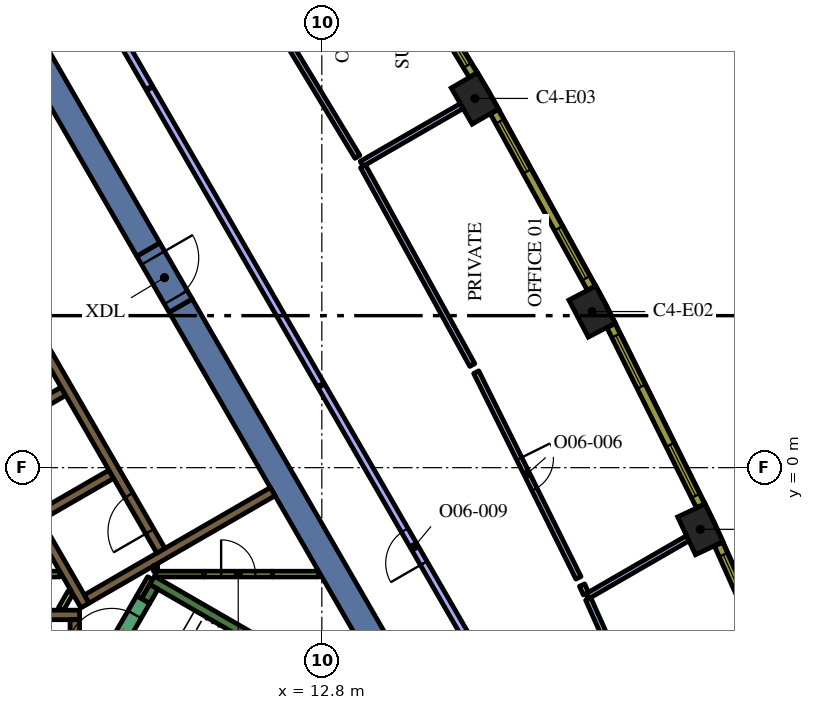
"""IFC4 building model, lengths in metres.
Left out: names, types, materials, properties, quantities, classifications, styles, units other than length and angle.
Written with IfcOpenShell. Run it as: python <this file> out.ifc"""

import sys

from ifc_helpers import new_model, si_unit, direction, frame, frame_2d, origin, origin_2d, place, context, subcontext, project, spatial, polyline, rectangle, outline, extrude, element, fill, save


model = new_model("IFC4")
c1 = context("Model", 3, precision=1e-05, world=origin(), true_north=direction((0.0, 1.0)))
c2 = subcontext(c1, "Body", "Model", "MODEL_VIEW")
j1 = project(units=[si_unit("LENGTHUNIT", "METRE"), si_unit("PLANEANGLEUNIT", "RADIAN")], contexts=[c1])
p1 = place(None, origin())
s1 = spatial("IfcSite", under=j1, at=p1, CompositionType="ELEMENT")
p2 = place(p1, origin())
s2 = spatial("IfcBuilding", under=s1, at=p2, CompositionType="ELEMENT")
p3 = place(p2, frame((0.0, 0.0, 210.0)))
s3 = spatial("IfcBuildingStorey", under=s2, at=p3, CompositionType="ELEMENT", Elevation=210.0)
for number, where, z_axis, x_axis in (
    (1, (22.76, -1.623, 0.0), (0.0, 0.0, 1.0), (-0.426, 0.905, 0.0)),
    (2, (19.912, 4.108, 0.0), (0.0, 0.0, 1.0), (-0.464, 0.886, 0.0)),
    (3, (16.827, 9.715, 0.0), (0.0, 0.0, 1.0), (-0.5, 0.866, 0.0)),
):
    element("IfcColumn", number, at=place(p3, frame(where, z_axis=z_axis, x_axis=x_axis)), inside=s3, PredefinedType="COLUMN", context=c2, shape_type="SweptSolid", body=[
        extrude(rectangle(XDim=1.1, YDim=0.8, at=origin_2d()), origin(), (0.0, 0.0, 1.0), 4.2),
    ])
for number, where, z_axis, x_axis in (
    (4, (9.085, 4.264, 0.0), (0.0, 0.0, 1.0), (0.5, -0.866, 0.0)),
    (5, (8.235, 5.736, 0.0), (0.0, 0.0, 1.0), (-0.5, 0.866, 0.0)),
):
    element("IfcWall", number, at=place(p3, frame(where, z_axis=z_axis, x_axis=x_axis)), inside=s3, PredefinedType="SOLIDWALL", context=c2, shape_type="SweptSolid", body=[
        extrude(rectangle(XDim=12.472, YDim=0.7, at=frame_2d((6.236, 0.0))), origin(), (0.0, 0.0, 1.0), 4.2),
    ])
p4 = place(p3, frame((8.334, -2.964, 0.0), z_axis=(0.0, 0.0, 1.0), x_axis=(0.866016039709, -0.500016218704, 0.0)))
e6 = element("IfcWall", 6, at=p4, inside=s3, PredefinedType="SOLIDWALL", context=c2, shape_type="SweptSolid", body=[
    extrude(rectangle(XDim=7.05, YDim=0.25, at=frame_2d((3.525, 0.0))), origin(), (0.0, 0.0, 1.0), 4.2),
])
p5 = place(p3, frame((8.163, -3.511, 0.0), z_axis=(0.0, 0.0, 1.0), x_axis=(0.500127794843, 0.865951608824, 0.0)))
e7 = element("IfcWall", 7, at=p5, inside=s3, PredefinedType="SOLIDWALL", context=c2, shape_type="SweptSolid", body=[
    extrude(rectangle(XDim=0.435, YDim=0.25, at=frame_2d((0.217, 0.0))), origin(), (0.0, 0.0, 1.0), 4.2),
])
p6 = place(p3, frame((-5.806, -3.875, 0.0), z_axis=(0.0, 0.0, 1.0), x_axis=(1.0, 0.0, 0.0)))
e8 = element("IfcWall", 8, at=p6, inside=s3, PredefinedType="SOLIDWALL", context=c2, shape_type="SweptSolid", body=[
    extrude(rectangle(XDim=12.231, YDim=0.25, at=frame_2d((6.116, 0.0))), origin(), (0.0, 0.0, 1.0), 4.2),
])
p7 = place(p3, frame((6.3, -7.24, 0.0), z_axis=(0.0, 0.0, 1.0), x_axis=(0.0, 1.0, 0.0)))
e9 = element("IfcWall", 9, at=p7, inside=s3, PredefinedType="SOLIDWALL", context=c2, shape_type="SweptSolid", body=[
    extrude(rectangle(XDim=3.24, YDim=0.25, at=frame_2d((1.62, 0.0))), origin(), (0.0, 0.0, 1.0), 4.2),
])
p8 = place(p3, origin())
e10 = element("IfcWall", 10, at=p8, inside=s3, PredefinedType="SOLIDWALL", context=c2, shape_type="SweptSolid", body=[
    extrude(outline(polyline([(0.332, 6.925), (0.335, 6.925), (0.335, 6.925), (0.335, 6.925), (0.335, 7.075), (0.335, 7.075), (0.335, 7.075), (0.245, 7.075), (0.035, 7.439), (0.252, 7.564), (0.377, 7.348), (1.512, 5.382), (1.637, 5.165), (2.221, 4.153), (2.771, 3.199), (2.896, 2.983), (3.138, 2.564), (4.031, 1.017), (4.156, 0.801), (5.292, -1.165), (5.417, -1.382), (6.073, -2.519), (6.552, -3.348), (6.677, -3.564), (6.46, -3.689), (0.332, 6.925)])), origin(), (0.0, 0.0, 1.0), 4.2),
])
for number, where, z_axis, x_axis in (
    (11, (4.094, 0.909, 0.0), (0.0, 0.0, 1.0), (0.866, 0.5, 0.0)),
    (12, (5.354, -1.274, 0.0), (0.0, 0.0, 1.0), (0.866, 0.5, 0.0)),
):
    element("IfcWall", number, at=place(p3, frame(where, z_axis=z_axis, x_axis=x_axis)), inside=s3, PredefinedType="SOLIDWALL", context=c2, shape_type="SweptSolid", body=[
        extrude(rectangle(XDim=2.2, YDim=0.25, at=frame_2d((1.1, 0.0))), origin(), (0.0, 0.0, 1.0), 4.2),
    ])
p9 = place(p3, frame((11.507, -0.631, 0.0), z_axis=(0.0, 0.0, 1.0), x_axis=(-0.866011447264, -0.500024172624, 0.0)))
e13 = element("IfcWall", 13, at=p9, inside=s3, PredefinedType="SOLIDWALL", context=c2, shape_type="SweptSolid", body=[
    extrude(rectangle(XDim=5.65, YDim=0.25, at=frame_2d((2.825, 0.0))), origin(), (0.0, 0.0, 1.0), 4.2),
])
p10 = place(p3, frame((3.238, -2.8, 0.0), z_axis=(0.0, 0.0, 1.0), x_axis=(1.0, 0.0, 0.0)))
e14 = element("IfcWall", 14, at=p10, inside=s3, PredefinedType="PARTITIONING", context=c2, shape_type="SweptSolid", body=[
    extrude(rectangle(XDim=2.672, YDim=0.15, at=frame_2d((1.336, 0.0))), origin(), (0.0, 0.0, 1.0), 3.45),
])
p11 = place(p3, frame((8.412, -2.8, 0.0), z_axis=(0.0, 0.0, 1.0), x_axis=(1.0, 0.0, 0.0)))
e15 = element("IfcWall", 15, at=p11, inside=s3, PredefinedType="PARTITIONING", context=c2, shape_type="SweptSolid", body=[
    extrude(rectangle(XDim=1.288, YDim=0.15, at=frame_2d((0.644, 0.0))), origin(), (0.0, 0.0, 1.0), 4.2),
])
p12 = place(p3, frame((8.37, -2.65, 0.0), z_axis=(0.0, 0.0, 1.0), x_axis=(1.0, 0.0, 0.0)))
e16 = element("IfcWall", 16, at=p12, inside=s3, PredefinedType="PARTITIONING", context=c2, shape_type="SweptSolid", body=[
    extrude(rectangle(XDim=0.108, YDim=0.15, at=frame_2d((0.054, 0.0))), origin(), (0.0, 0.0, 1.0), 4.2),
])
p13 = place(p3, frame((8.281, -2.907, 0.0), z_axis=(0.0, 0.0, 1.0), x_axis=(-0.500193841991, -0.86591346013, 0.0)))
e17 = element("IfcWall", 17, at=p13, inside=s3, PredefinedType="PARTITIONING", context=c2, shape_type="SweptSolid", body=[
    extrude(rectangle(XDim=0.583, YDim=0.15, at=frame_2d((0.292, 0.0))), origin(), (0.0, 0.0, 1.0), 4.2),
])
p14 = place(p3, frame((11.5, -2.801, 0.0), z_axis=(0.0, 0.0, 1.0), x_axis=(1.0, 0.0, 0.0)))
e18 = element("IfcWall", 18, at=p14, inside=s3, PredefinedType="PARTITIONING", context=c2, shape_type="SweptSolid", body=[
    extrude(rectangle(XDim=1.222, YDim=0.15, at=frame_2d((0.611, 0.0))), origin(), (0.0, 0.0, 1.0), 3.45),
])
p15 = place(p3, frame((5.936, -3.718, 0.0), z_axis=(0.0, 0.0, 1.0), x_axis=(0.499890179513, 0.866088799389, 0.0)))
e19 = element("IfcWall", 19, at=p15, inside=s3, PredefinedType="PARTITIONING", context=c2, shape_type="SweptSolid", body=[
    extrude(rectangle(XDim=0.504, YDim=0.15, at=frame_2d((0.252, 0.0))), origin(), (0.0, 0.0, 1.0), 3.45),
])
p16 = place(p3, frame((8.565, -2.185, 0.0), z_axis=(0.0, 0.0, 1.0), x_axis=(-0.499997954832, 0.866026584559, 0.0)))
e20 = element("IfcWall", 20, at=p16, inside=s3, PredefinedType="SOLIDWALL", context=c2, shape_type="SweptSolid", body=[
    extrude(rectangle(XDim=12.35, YDim=0.25, at=frame_2d((6.175, 0.0))), origin(), (0.0, 0.0, 1.0), 4.2),
])
p17 = place(p16, frame((0.585, 0.0, 0.0)))
e21 = element("IfcOpeningElement", 21, at=p17, cuts=e20, PredefinedType="OPENING", context=c2, shape_type="SweptSolid", body=[
    extrude(rectangle(XDim=1.1, YDim=2.1, at=frame_2d((0.55, 1.05))), frame((0.0, 0.135, 0.0), z_axis=(0.0, -1.0, 0.0), x_axis=(1.0, 0.0, 0.0)), (0.0, 0.0, 1.0), 0.27),
])
p18 = place(p3, frame((7.048, -5.292, 0.0), z_axis=(0.0, 0.0, 1.0), x_axis=(0.49994051562, 0.866059744384, 0.0)))
e22 = element("IfcWall", 22, at=p18, inside=s3, PredefinedType="SOLIDWALL", context=c2, shape_type="SweptSolid", body=[
    extrude(rectangle(XDim=2.1, YDim=0.4, at=frame_2d((1.05, 0.0))), origin(), (0.0, 0.0, 1.0), 4.2),
])
p19 = place(p18, frame((0.45, 0.0, 0.0)))
e23 = element("IfcOpeningElement", 23, at=p19, cuts=e22, PredefinedType="OPENING", context=c2, shape_type="SweptSolid", body=[
    extrude(rectangle(XDim=1.2, YDim=2.1, at=frame_2d((0.6, 1.05))), frame((0.0, 0.21, 0.0), z_axis=(0.0, -1.0, 0.0), x_axis=(1.0, 0.0, 0.0)), (0.0, 0.0, 1.0), 0.42),
])
p20 = place(p3, frame((8.235, 5.736, 0.0), z_axis=(0.0, 0.0, 1.0), x_axis=(0.499954529098, -0.86605165483, 0.0)))
e24 = element("IfcWall", 24, at=p20, inside=s3, PredefinedType="SOLIDWALL", context=c2, shape_type="SweptSolid", body=[
    extrude(rectangle(XDim=1.7, YDim=0.7, at=frame_2d((0.85, 0.0))), origin(), (0.0, 0.0, 1.0), 4.2),
])
p21 = place(p20, frame((0.25, 0.0, 0.0)))
e25 = element("IfcOpeningElement", 25, at=p21, cuts=e24, PredefinedType="OPENING", context=c2, shape_type="SweptSolid", body=[
    extrude(rectangle(XDim=1.2, YDim=2.1, at=frame_2d((0.6, 1.05))), frame((0.0, 0.36, 0.0), z_axis=(0.0, -1.0, 0.0), x_axis=(1.0, 0.0, 0.0)), (0.0, 0.0, 1.0), 0.72),
])
p22 = place(p3, frame((9.7, -2.8, 0.0), z_axis=(0.0, 0.0, 1.0), x_axis=(1.0, 0.0, 0.0)))
e26 = element("IfcWall", 26, at=p22, inside=s3, PredefinedType="PARTITIONING", context=c2, shape_type="SweptSolid", body=[
    extrude(rectangle(XDim=1.8, YDim=0.15, at=frame_2d((0.9, 0.0))), origin(), (0.0, 0.0, 1.0), 3.45),
])
p23 = place(p22, frame((0.45, 0.0, 0.0)))
e27 = element("IfcOpeningElement", 27, at=p23, cuts=e26, PredefinedType="OPENING", context=c2, shape_type="SweptSolid", body=[
    extrude(rectangle(XDim=0.9, YDim=2.1, at=frame_2d((0.45, 1.05))), frame((0.0, 0.085, 0.0), z_axis=(0.0, -1.0, 0.0), x_axis=(1.0, 0.0, 0.0)), (0.0, 0.0, 1.0), 0.17),
])
p24 = place(p3, frame((19.78, -3.386, 0.0), z_axis=(0.0, 0.0, 1.0), x_axis=(0.866063280451, 0.49993438995, 0.0)))
e28 = element("IfcWall", 28, at=p24, inside=s3, PredefinedType="PARTITIONING", context=c2, shape_type="SweptSolid", body=[
    extrude(rectangle(XDim=3.058, YDim=0.15, at=frame_2d((1.529, 0.0))), origin(), (0.0, 0.0, 1.0), 3.45),
])
p25 = place(p3, frame((19.811, -3.455, 0.0), z_axis=(0.0, 0.0, 1.0), x_axis=(0.407605393886, -0.913158169692, 0.0)))
e29 = element("IfcWall", 29, at=p25, inside=s3, PredefinedType="PARTITIONING", context=c2, shape_type="SweptSolid", body=[
    extrude(rectangle(XDim=5.279, YDim=0.15, at=frame_2d((2.64, 0.0))), origin(), (0.0, 0.0, 1.0), 3.45),
])
p26 = place(p25, frame((2.179, 0.0, 0.0)))
e30 = element("IfcOpeningElement", 30, at=p26, cuts=e29, PredefinedType="OPENING", context=c2, shape_type="SweptSolid", body=[
    extrude(rectangle(XDim=0.9, YDim=2.1, at=frame_2d((0.45, 1.05))), frame((0.0, 0.085, 0.0), z_axis=(0.0, -1.0, 0.0), x_axis=(1.0, 0.0, 0.0)), (0.0, 0.0, 1.0), 0.17),
])
p27 = place(p3, frame((13.848, 7.995, 0.0), z_axis=(0.0, 0.0, 1.0), x_axis=(0.86603583403, 0.49998193385, 0.0)))
e31 = element("IfcWall", 31, at=p27, inside=s3, PredefinedType="PARTITIONING", context=c2, shape_type="SweptSolid", body=[
    extrude(rectangle(XDim=3.041, YDim=0.15, at=frame_2d((1.52, 0.0))), origin(), (0.0, 0.0, 1.0), 3.45),
])
p28 = place(p3, frame((19.75, -3.317, 0.0), z_axis=(0.0, 0.0, 1.0), x_axis=(-0.406774979688, 0.913528388119, 0.0)))
e32 = element("IfcWall", 32, at=p28, inside=s3, PredefinedType="PARTITIONING", context=c2, shape_type="SweptSolid", body=[
    extrude(rectangle(XDim=0.249, YDim=0.15, at=frame_2d((0.125, 0.0))), origin(), (0.0, 0.0, 1.0), 3.45),
])
p29 = place(p3, frame((16.863, 2.513, 0.0), z_axis=(0.0, 0.0, 1.0), x_axis=(0.445159947046, -0.895451071553, 0.0)))
e33 = element("IfcWall", 33, at=p29, inside=s3, PredefinedType="PARTITIONING", context=c2, shape_type="SweptSolid", body=[
    extrude(rectangle(XDim=6.043, YDim=0.15, at=frame_2d((3.021, 0.0))), origin(), (0.0, 0.0, 1.0), 3.45),
])
p30 = place(p29, frame((2.542, 0.0, 0.0)))
e34 = element("IfcOpeningElement", 34, at=p30, cuts=e33, PredefinedType="OPENING", context=c2, shape_type="SweptSolid", body=[
    extrude(rectangle(XDim=0.9, YDim=2.1, at=frame_2d((0.45, 1.05))), frame((0.0, 0.085, 0.0), z_axis=(0.0, -1.0, 0.0), x_axis=(1.0, 0.0, 0.0)), (0.0, 0.0, 1.0), 0.17),
])
p31 = place(p3, frame((16.76, 2.7, 0.0), z_axis=(0.0, 0.0, 1.0), x_axis=(-0.481907755985, 0.876221955169, 0.0)))
e35 = element("IfcWall", 35, at=p31, inside=s3, PredefinedType="PARTITIONING", context=c2, shape_type="SweptSolid", body=[
    extrude(rectangle(XDim=5.967, YDim=0.15, at=frame_2d((2.984, 0.0))), origin(), (0.0, 0.0, 1.0), 3.45),
])
p32 = place(p3, frame((13.737, 8.178, 0.0), z_axis=(0.0, 0.0, 1.0), x_axis=(-0.517884383874, 0.855450620983, 0.0)))
e36 = element("IfcWall", 36, at=p32, inside=s3, PredefinedType="PARTITIONING", context=c2, shape_type="SweptSolid", body=[
    extrude(rectangle(XDim=6.043, YDim=0.15, at=frame_2d((3.021, 0.0))), origin(), (0.0, 0.0, 1.0), 3.45),
])
p33 = place(p3, frame((12.772, 2.178, 0.0), z_axis=(0.0, 0.0, 1.0), x_axis=(-0.5000018851, 0.866024315419, 0.0)))
e37 = element("IfcWall", 37, at=p33, inside=s3, PredefinedType="PARTITIONING", context=c2, shape_type="SweptSolid", body=[
    extrude(rectangle(XDim=9.0, YDim=0.2, at=frame_2d((4.5, 0.0))), origin(), (0.0, 0.0, 1.0), 3.45),
])
p34 = place(p3, frame((8.257, 9.998, 0.0), z_axis=(0.0, 0.0, 1.0), x_axis=(-0.499998405424, 0.866026324412, 0.0)))
e38 = element("IfcWall", 38, at=p34, inside=s3, PredefinedType="PARTITIONING", context=c2, shape_type="SweptSolid", body=[
    extrude(rectangle(XDim=9.267, YDim=0.2, at=frame_2d((4.633, 0.0))), origin(), (0.0, 0.0, 1.0), 3.45),
])
p35 = place(p3, frame((17.681, -6.324, 0.0), z_axis=(0.0, 0.0, 1.0), x_axis=(-0.500021153861, 0.866013190252, 0.0)))
e39 = element("IfcWall", 39, at=p35, inside=s3, PredefinedType="PARTITIONING", context=c2, shape_type="SweptSolid", body=[
    extrude(rectangle(XDim=9.787, YDim=0.2, at=frame_2d((4.894, 0.0))), origin(), (0.0, 0.0, 1.0), 3.45),
])
p36 = place(p35, frame((4.4, 0.0, 0.0)))
e40 = element("IfcOpeningElement", 40, at=p36, cuts=e39, PredefinedType="OPENING", context=c2, shape_type="SweptSolid", body=[
    extrude(rectangle(XDim=1.0, YDim=2.1, at=frame_2d((0.5, 1.05))), frame((0.0, 0.11, 0.0), z_axis=(0.0, -1.0, 0.0), x_axis=(1.0, 0.0, 0.0)), (0.0, 0.0, 1.0), 0.22),
])
p37 = place(p3, frame((25.405, -6.861, 0.0), z_axis=(0.0, 0.0, 1.0), x_axis=(-0.407579651789, 0.913169659728, 0.0)))
e41 = element("IfcWall", 41, at=p37, inside=s3, PredefinedType="SOLIDWALL", context=c2, shape_type="SweptSolid", body=[
    extrude(rectangle(XDim=5.311, YDim=0.24, at=frame_2d((2.655, 0.0))), origin(), (0.0, 0.0, 1.0), 3.95),
])
p38 = place(p37, frame((0.271, 0.0, 0.9)))
e42 = element("IfcOpeningElement", 42, at=p38, cuts=e41, PredefinedType="OPENING", context=c2, shape_type="SweptSolid", body=[
    extrude(rectangle(XDim=1.5, YDim=2.55, at=frame_2d((0.75, 1.275))), frame((0.0, 0.13, 0.0), z_axis=(0.0, -1.0, 0.0), x_axis=(1.0, 0.0, 0.0)), (0.0, 0.0, 1.0), 0.26),
])
p39 = place(p37, frame((3.504, 0.0, 0.9)))
e43 = element("IfcOpeningElement", 43, at=p39, cuts=e41, PredefinedType="OPENING", context=c2, shape_type="SweptSolid", body=[
    extrude(rectangle(XDim=1.5, YDim=2.55, at=frame_2d((0.75, 1.275))), frame((0.0, 0.13, 0.0), z_axis=(0.0, -1.0, 0.0), x_axis=(1.0, 0.0, 0.0)), (0.0, 0.0, 1.0), 0.26),
])
p40 = place(p3, frame((22.766, -1.005, 0.0), z_axis=(0.0, 0.0, 1.0), x_axis=(-0.445129582031, 0.895466166419, 0.0)))
e44 = element("IfcWall", 44, at=p40, inside=s3, PredefinedType="SOLIDWALL", context=c2, shape_type="SweptSolid", body=[
    extrude(rectangle(XDim=5.298, YDim=0.24, at=frame_2d((2.649, 0.0))), origin(), (0.0, 0.0, 1.0), 3.95),
])
p41 = place(p40, frame((0.295, 0.0, 0.9)))
e45 = element("IfcOpeningElement", 45, at=p41, cuts=e44, PredefinedType="OPENING", context=c2, shape_type="SweptSolid", body=[
    extrude(rectangle(XDim=1.5, YDim=2.55, at=frame_2d((0.75, 1.275))), frame((0.0, 0.13, 0.0), z_axis=(0.0, -1.0, 0.0), x_axis=(1.0, 0.0, 0.0)), (0.0, 0.0, 1.0), 0.26),
])
p42 = place(p40, frame((3.504, 0.0, 0.9)))
e46 = element("IfcOpeningElement", 46, at=p42, cuts=e44, PredefinedType="OPENING", context=c2, shape_type="SweptSolid", body=[
    extrude(rectangle(XDim=1.5, YDim=2.55, at=frame_2d((0.75, 1.275))), frame((0.0, 0.13, 0.0), z_axis=(0.0, -1.0, 0.0), x_axis=(1.0, 0.0, 0.0)), (0.0, 0.0, 1.0), 0.26),
])
p43 = place(p3, frame((19.892, 4.725, 0.0), z_axis=(0.0, 0.0, 1.0), x_axis=(-0.481925825015, 0.876212017256, 0.0)))
e47 = element("IfcWall", 47, at=p43, inside=s3, PredefinedType="SOLIDWALL", context=c2, shape_type="SweptSolid", body=[
    extrude(rectangle(XDim=5.299, YDim=0.24, at=frame_2d((2.649, 0.0))), origin(), (0.0, 0.0, 1.0), 3.95),
])
p44 = place(p43, frame((0.295, 0.0, 0.9)))
e48 = element("IfcOpeningElement", 48, at=p44, cuts=e47, PredefinedType="OPENING", context=c2, shape_type="SweptSolid", body=[
    extrude(rectangle(XDim=1.5, YDim=2.55, at=frame_2d((0.75, 1.275))), frame((0.0, 0.13, 0.0), z_axis=(0.0, -1.0, 0.0), x_axis=(1.0, 0.0, 0.0)), (0.0, 0.0, 1.0), 0.26),
])
p45 = place(p43, frame((3.504, 0.0, 0.9)))
e49 = element("IfcOpeningElement", 49, at=p45, cuts=e47, PredefinedType="OPENING", context=c2, shape_type="SweptSolid", body=[
    extrude(rectangle(XDim=1.5, YDim=2.55, at=frame_2d((0.75, 1.275))), frame((0.0, 0.13, 0.0), z_axis=(0.0, -1.0, 0.0), x_axis=(1.0, 0.0, 0.0)), (0.0, 0.0, 1.0), 0.26),
])
p46 = place(p3, frame((16.782, 10.331, 0.0), z_axis=(0.0, 0.0, 1.0), x_axis=(-0.517846166225, 0.855473756538, 0.0)))
e50 = element("IfcWall", 50, at=p46, inside=s3, PredefinedType="SOLIDWALL", context=c2, shape_type="SweptSolid", body=[
    extrude(rectangle(XDim=5.298, YDim=0.24, at=frame_2d((2.649, 0.0))), origin(), (0.0, 0.0, 1.0), 3.95),
])
p47 = place(p46, frame((0.294, 0.0, 0.9)))
e51 = element("IfcOpeningElement", 51, at=p47, cuts=e50, PredefinedType="OPENING", context=c2, shape_type="SweptSolid", body=[
    extrude(rectangle(XDim=1.5, YDim=2.55, at=frame_2d((0.75, 1.275))), frame((0.0, 0.13, 0.0), z_axis=(0.0, -1.0, 0.0), x_axis=(1.0, 0.0, 0.0)), (0.0, 0.0, 1.0), 0.26),
])
p48 = place(p46, frame((3.504, 0.0, 0.9)))
e52 = element("IfcOpeningElement", 52, at=p48, cuts=e50, PredefinedType="OPENING", context=c2, shape_type="SweptSolid", body=[
    extrude(rectangle(XDim=1.5, YDim=2.55, at=frame_2d((0.75, 1.275))), frame((0.0, 0.13, 0.0), z_axis=(0.0, -1.0, 0.0), x_axis=(1.0, 0.0, 0.0)), (0.0, 0.0, 1.0), 0.26),
])
p49 = place(p17, origin())
e53 = element("IfcDoor", 53, at=p49, inside=s3, OperationType="DOUBLE_DOOR_SLIDING", PredefinedType="DOOR", context=c2, shape_type="SweptSolid", body=[
    extrude(rectangle(XDim=1.1, YDim=2.1, at=frame_2d((0.55, 1.05))), frame((0.0, 0.025, 0.0), z_axis=(0.0, -1.0, 0.0), x_axis=(1.0, 0.0, 0.0)), (0.0, 0.0, 1.0), 0.05),
])
fill(e21, e53)
p50 = place(p19, origin())
e54 = element("IfcDoor", 54, at=p50, inside=s3, OperationType="SINGLE_SWING_LEFT", PredefinedType="DOOR", context=c2, shape_type="SweptSolid", body=[
    extrude(rectangle(XDim=1.2, YDim=2.1, at=frame_2d((0.6, 1.05))), frame((0.0, 0.025, 0.0), z_axis=(0.0, -1.0, 0.0), x_axis=(1.0, 0.0, 0.0)), (0.0, 0.0, 1.0), 0.05),
])
fill(e23, e54)
p51 = place(p21, origin())
e55 = element("IfcDoor", 55, at=p51, inside=s3, OperationType="SINGLE_SWING_LEFT", PredefinedType="DOOR", context=c2, shape_type="SweptSolid", body=[
    extrude(rectangle(XDim=1.2, YDim=2.1, at=frame_2d((0.6, 1.05))), frame((0.0, 0.025, 0.0), z_axis=(0.0, -1.0, 0.0), x_axis=(1.0, 0.0, 0.0)), (0.0, 0.0, 1.0), 0.05),
])
fill(e25, e55)
p52 = place(p23, origin())
e56 = element("IfcDoor", 56, at=p52, inside=s3, OperationType="SINGLE_SWING_LEFT", PredefinedType="DOOR", context=c2, shape_type="SweptSolid", body=[
    extrude(rectangle(XDim=0.9, YDim=2.1, at=frame_2d((0.45, 1.05))), frame((0.0, 0.025, 0.0), z_axis=(0.0, -1.0, 0.0), x_axis=(1.0, 0.0, 0.0)), (0.0, 0.0, 1.0), 0.05),
])
fill(e27, e56)
p53 = place(p30, origin())
e57 = element("IfcDoor", 57, at=p53, inside=s3, OperationType="SINGLE_SWING_LEFT", PredefinedType="DOOR", context=c2, shape_type="SweptSolid", body=[
    extrude(rectangle(XDim=0.9, YDim=2.1, at=frame_2d((0.45, 1.05))), frame((0.0, 0.025, 0.0), z_axis=(0.0, -1.0, 0.0), x_axis=(1.0, 0.0, 0.0)), (0.0, 0.0, 1.0), 0.05),
])
fill(e34, e57)
p54 = place(p36, origin())
e58 = element("IfcDoor", 58, at=p54, inside=s3, OperationType="SINGLE_SWING_RIGHT", PredefinedType="DOOR", context=c2, shape_type="SweptSolid", body=[
    extrude(rectangle(XDim=1.0, YDim=2.1, at=frame_2d((0.5, 1.05))), frame((0.0, 0.025, 0.0), z_axis=(0.0, -1.0, 0.0), x_axis=(1.0, 0.0, 0.0)), (0.0, 0.0, 1.0), 0.05),
])
fill(e40, e58)
p55 = place(p39, origin())
e59 = element("IfcWindow", 59, at=p55, inside=s3, PartitioningType="SINGLE_PANEL", PredefinedType="WINDOW", context=c2, shape_type="SweptSolid", body=[
    extrude(rectangle(XDim=1.5, YDim=2.55, at=frame_2d((0.75, 1.275))), frame((0.0, 0.04, 0.0), z_axis=(0.0, -1.0, 0.0), x_axis=(1.0, 0.0, 0.0)), (0.0, 0.0, 1.0), 0.06),
])
fill(e43, e59)
p56 = place(p41, origin())
e60 = element("IfcWindow", 60, at=p56, inside=s3, PartitioningType="SINGLE_PANEL", PredefinedType="WINDOW", context=c2, shape_type="SweptSolid", body=[
    extrude(rectangle(XDim=1.5, YDim=2.55, at=frame_2d((0.75, 1.275))), frame((0.0, 0.04, 0.0), z_axis=(0.0, -1.0, 0.0), x_axis=(1.0, 0.0, 0.0)), (0.0, 0.0, 1.0), 0.06),
])
fill(e45, e60)
p57 = place(p42, origin())
e61 = element("IfcWindow", 61, at=p57, inside=s3, PartitioningType="SINGLE_PANEL", PredefinedType="WINDOW", context=c2, shape_type="SweptSolid", body=[
    extrude(rectangle(XDim=1.5, YDim=2.55, at=frame_2d((0.75, 1.275))), frame((0.0, 0.04, 0.0), z_axis=(0.0, -1.0, 0.0), x_axis=(1.0, 0.0, 0.0)), (0.0, 0.0, 1.0), 0.06),
])
fill(e46, e61)
p58 = place(p44, origin())
e62 = element("IfcWindow", 62, at=p58, inside=s3, PartitioningType="SINGLE_PANEL", PredefinedType="WINDOW", context=c2, shape_type="SweptSolid", body=[
    extrude(rectangle(XDim=1.5, YDim=2.55, at=frame_2d((0.75, 1.275))), frame((0.0, 0.04, 0.0), z_axis=(0.0, -1.0, 0.0), x_axis=(1.0, 0.0, 0.0)), (0.0, 0.0, 1.0), 0.06),
])
fill(e48, e62)
p59 = place(p45, origin())
e63 = element("IfcWindow", 63, at=p59, inside=s3, PartitioningType="SINGLE_PANEL", PredefinedType="WINDOW", context=c2, shape_type="SweptSolid", body=[
    extrude(rectangle(XDim=1.5, YDim=2.55, at=frame_2d((0.75, 1.275))), frame((0.0, 0.04, 0.0), z_axis=(0.0, -1.0, 0.0), x_axis=(1.0, 0.0, 0.0)), (0.0, 0.0, 1.0), 0.06),
])
fill(e49, e63)
p60 = place(p47, origin())
e64 = element("IfcWindow", 64, at=p60, inside=s3, PartitioningType="SINGLE_PANEL", PredefinedType="WINDOW", context=c2, shape_type="SweptSolid", body=[
    extrude(rectangle(XDim=1.5, YDim=2.55, at=frame_2d((0.75, 1.275))), frame((0.0, 0.04, 0.0), z_axis=(0.0, -1.0, 0.0), x_axis=(1.0, 0.0, 0.0)), (0.0, 0.0, 1.0), 0.06),
])
fill(e51, e64)
save(model, sys.argv[1])
